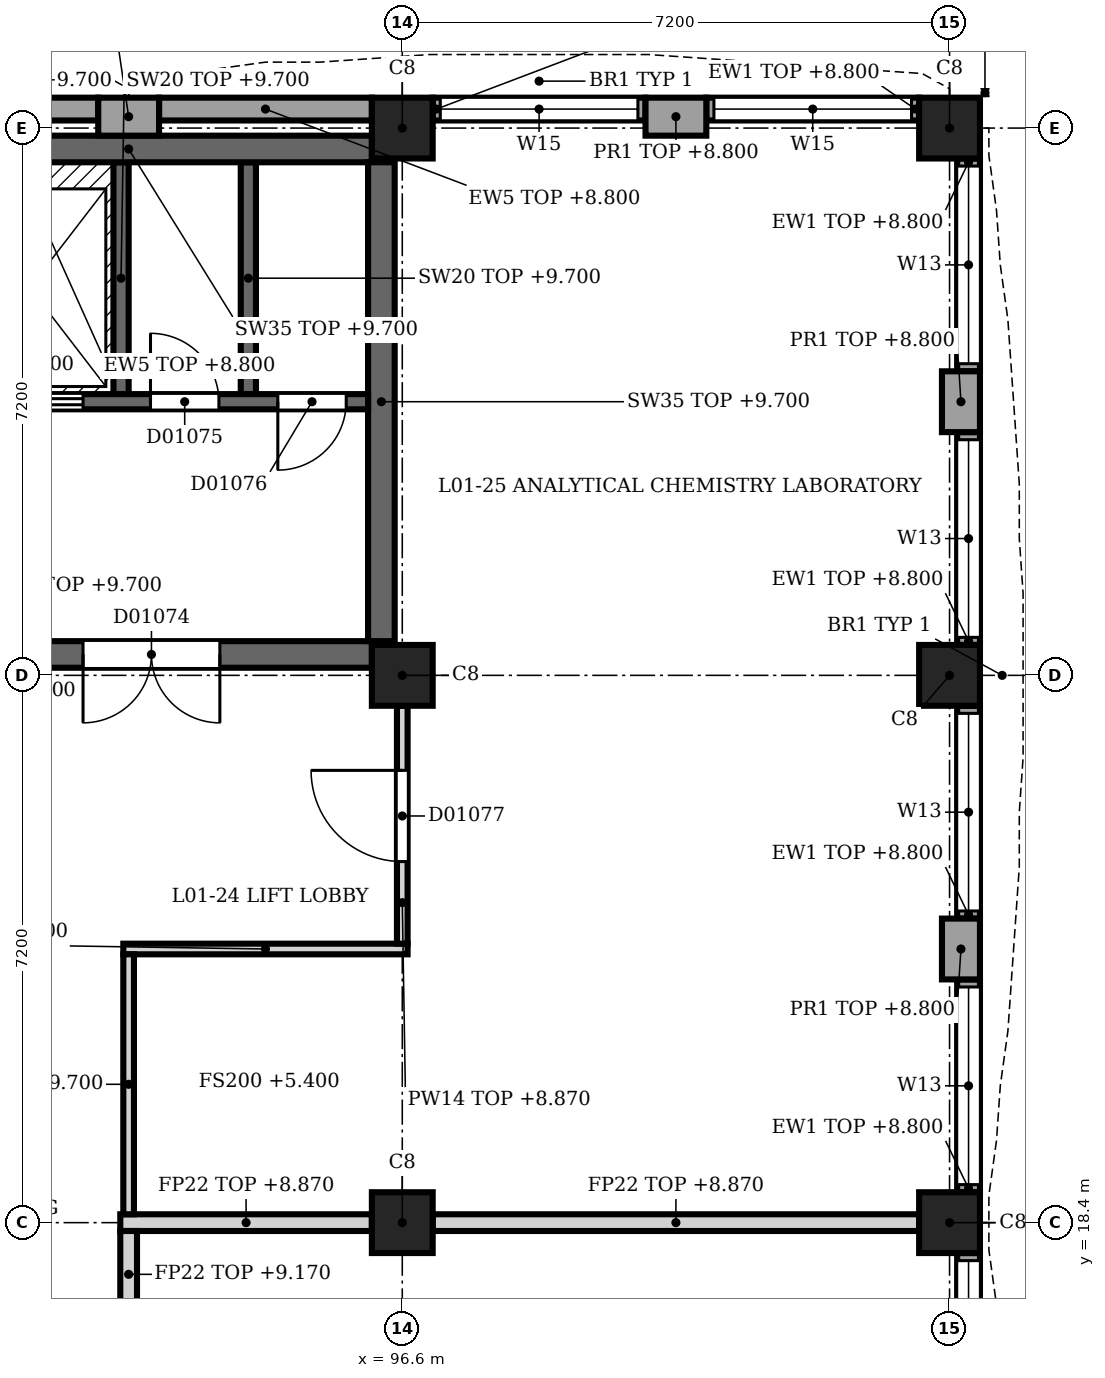
"""IFC4 building model, lengths in metres.
Left out: names, types, materials, properties, quantities, classifications, styles, units other than length and angle.
Written with IfcOpenShell. Run it as: python <this file> out.ifc"""

import sys

from ifc_helpers import new_model, si_unit, direction, frame, frame_2d, origin, origin_2d, place, context, subcontext, project, spatial, rectangle, extrude, element, fill, save


model = new_model("IFC4")
c1 = context("Model", 3, precision=1e-05, world=origin(), true_north=direction((0.0, 1.0)))
c2 = subcontext(c1, "Body", "Model", "MODEL_VIEW")
j1 = project(units=[si_unit("LENGTHUNIT", "METRE"), si_unit("PLANEANGLEUNIT", "RADIAN")], contexts=[c1])
p1 = place(None, origin())
s1 = spatial("IfcSite", under=j1, at=p1, CompositionType="ELEMENT")
p2 = place(p1, origin())
s2 = spatial("IfcBuilding", under=s1, at=p2, CompositionType="ELEMENT")
p3 = place(p2, frame((0.0, 0.0, 5.4)))
s3 = spatial("IfcBuildingStorey", under=s2, at=p3, CompositionType="ELEMENT", Elevation=5.4)
for number, where, z_axis, x_axis in (
    (1, (96.6, 18.4, 0.0), (0.0, 0.0, 1.0), (1.0, 0.0, 0.0)),
    (2, (96.6, 25.6, 0.0), (0.0, 0.0, 1.0), (1.0, 0.0, 0.0)),
    (3, (96.6, 32.8, 0.0), (0.0, 0.0, 1.0), (1.0, 0.0, 0.0)),
    (4, (103.8, 18.4, 0.0), (0.0, 0.0, 1.0), (1.0, 0.0, 0.0)),
    (5, (103.8, 25.6, 0.0), (0.0, 0.0, 1.0), (1.0, 0.0, 0.0)),
    (6, (103.8, 32.8, 0.0), (0.0, 0.0, 1.0), (1.0, 0.0, 0.0)),
):
    element("IfcColumn", number, at=place(p3, frame(where, z_axis=z_axis, x_axis=x_axis)), inside=s3, PredefinedType="COLUMN", context=c2, shape_type="SweptSolid", body=[
        extrude(rectangle(XDim=0.8, YDim=0.8, at=origin_2d()), origin(), (0.0, 0.0, 1.0), 4.5),
    ])
p4 = place(p3, frame((92.6, 32.95, 0.0), z_axis=(0.0, 0.0, 1.0), x_axis=(1.0, 0.0, 0.0)))
e7 = element("IfcWall", 7, at=p4, inside=s3, PredefinedType="SOLIDWALL", context=c2, shape_type="SweptSolid", body=[
    extrude(rectangle(XDim=0.8, YDim=0.5, at=frame_2d((0.4, 0.0))), origin(), (0.0, 0.0, 1.0), 3.4),
])
p5 = place(p3, frame((99.8, 32.95, 0.0), z_axis=(0.0, 0.0, 1.0), x_axis=(1.0, 0.0, 0.0)))
e8 = element("IfcWall", 8, at=p5, inside=s3, PredefinedType="SOLIDWALL", context=c2, shape_type="SweptSolid", body=[
    extrude(rectangle(XDim=0.8, YDim=0.5, at=frame_2d((0.4, 0.0))), origin(), (0.0, 0.0, 1.0), 3.4),
])
for number, where, z_axis, x_axis in (
    (9, (89.8, 33.05, 0.0), (0.0, 0.0, 1.0), (1.0, 0.0, 0.0)),
    (10, (93.4, 33.05, 0.0), (0.0, 0.0, 1.0), (1.0, 0.0, 0.0)),
):
    element("IfcWall", number, at=place(p3, frame(where, z_axis=z_axis, x_axis=x_axis)), inside=s3, PredefinedType="SOLIDWALL", context=c2, shape_type="SweptSolid", body=[
        extrude(rectangle(XDim=2.8, YDim=0.3, at=frame_2d((1.4, 0.0))), origin(), (0.0, 0.0, 1.0), 3.4),
    ])
p6 = place(p3, frame((97.0, 33.05, 0.0), z_axis=(0.0, 0.0, 1.0), x_axis=(1.0, 0.0, 0.0)))
e11 = element("IfcWall", 11, at=p6, inside=s3, PredefinedType="SOLIDWALL", context=c2, shape_type="SweptSolid", body=[
    extrude(rectangle(XDim=2.8, YDim=0.3, at=frame_2d((1.4, 0.0))), origin(), (0.0, 0.0, 1.0), 3.4),
])
p7 = place(p6, frame((0.1, 0.0, 1.0)))
e12 = element("IfcOpeningElement", 12, at=p7, cuts=e11, PredefinedType="OPENING", context=c2, shape_type="SweptSolid", body=[
    extrude(rectangle(XDim=2.6, YDim=2.0, at=frame_2d((1.3, 1.0))), frame((0.0, 0.16, 0.0), z_axis=(0.0, -1.0, 0.0), x_axis=(1.0, 0.0, 0.0)), (0.0, 0.0, 1.0), 0.32),
])
p8 = place(p3, frame((100.6, 33.05, 0.0), z_axis=(0.0, 0.0, 1.0), x_axis=(1.0, 0.0, 0.0)))
e13 = element("IfcWall", 13, at=p8, inside=s3, PredefinedType="SOLIDWALL", context=c2, shape_type="SweptSolid", body=[
    extrude(rectangle(XDim=2.8, YDim=0.3, at=frame_2d((1.4, 0.0))), origin(), (0.0, 0.0, 1.0), 3.4),
])
p9 = place(p8, frame((0.1, 0.0, 1.0)))
e14 = element("IfcOpeningElement", 14, at=p9, cuts=e13, PredefinedType="OPENING", context=c2, shape_type="SweptSolid", body=[
    extrude(rectangle(XDim=2.6, YDim=2.0, at=frame_2d((1.3, 1.0))), frame((0.0, 0.16, 0.0), z_axis=(0.0, -1.0, 0.0), x_axis=(1.0, 0.0, 0.0)), (0.0, 0.0, 1.0), 0.32),
])
p10 = place(p3, frame((103.95, 29.6, 0.0), z_axis=(0.0, 0.0, 1.0), x_axis=(0.0, -1.0, 0.0)))
e15 = element("IfcWall", 15, at=p10, inside=s3, PredefinedType="SOLIDWALL", context=c2, shape_type="SweptSolid", body=[
    extrude(rectangle(XDim=0.8, YDim=0.5, at=frame_2d((0.4, 0.0))), origin(), (0.0, 0.0, 1.0), 3.4),
])
p11 = place(p3, frame((103.95, 22.4, 0.0), z_axis=(0.0, 0.0, 1.0), x_axis=(0.0, -1.0, 0.0)))
e16 = element("IfcWall", 16, at=p11, inside=s3, PredefinedType="SOLIDWALL", context=c2, shape_type="SweptSolid", body=[
    extrude(rectangle(XDim=0.8, YDim=0.5, at=frame_2d((0.4, 0.0))), origin(), (0.0, 0.0, 1.0), 3.4),
])
p12 = place(p3, frame((104.05, 32.4, 0.0), z_axis=(0.0, 0.0, 1.0), x_axis=(0.0, -1.0, 0.0)))
e17 = element("IfcWall", 17, at=p12, inside=s3, PredefinedType="SOLIDWALL", context=c2, shape_type="SweptSolid", body=[
    extrude(rectangle(XDim=2.8, YDim=0.3, at=frame_2d((1.4, 0.0))), origin(), (0.0, 0.0, 1.0), 3.4),
])
p13 = place(p12, frame((0.1, 0.0, 0.9)))
e18 = element("IfcOpeningElement", 18, at=p13, cuts=e17, PredefinedType="OPENING", context=c2, shape_type="SweptSolid", body=[
    extrude(rectangle(XDim=2.6, YDim=2.2, at=frame_2d((1.3, 1.1))), frame((0.0, 0.16, 0.0), z_axis=(0.0, -1.0, 0.0), x_axis=(1.0, 0.0, 0.0)), (0.0, 0.0, 1.0), 0.32),
])
p14 = place(p3, frame((104.05, 28.8, 0.0), z_axis=(0.0, 0.0, 1.0), x_axis=(0.0, -1.0, 0.0)))
e19 = element("IfcWall", 19, at=p14, inside=s3, PredefinedType="SOLIDWALL", context=c2, shape_type="SweptSolid", body=[
    extrude(rectangle(XDim=2.8, YDim=0.3, at=frame_2d((1.4, 0.0))), origin(), (0.0, 0.0, 1.0), 3.4),
])
p15 = place(p14, frame((0.1, 0.0, 0.9)))
e20 = element("IfcOpeningElement", 20, at=p15, cuts=e19, PredefinedType="OPENING", context=c2, shape_type="SweptSolid", body=[
    extrude(rectangle(XDim=2.6, YDim=2.2, at=frame_2d((1.3, 1.1))), frame((0.0, 0.16, 0.0), z_axis=(0.0, -1.0, 0.0), x_axis=(1.0, 0.0, 0.0)), (0.0, 0.0, 1.0), 0.32),
])
p16 = place(p3, frame((104.05, 25.2, 0.0), z_axis=(0.0, 0.0, 1.0), x_axis=(0.0, -1.0, 0.0)))
e21 = element("IfcWall", 21, at=p16, inside=s3, PredefinedType="SOLIDWALL", context=c2, shape_type="SweptSolid", body=[
    extrude(rectangle(XDim=2.8, YDim=0.3, at=frame_2d((1.4, 0.0))), origin(), (0.0, 0.0, 1.0), 3.4),
])
p17 = place(p16, frame((0.1, 0.0, 0.9)))
e22 = element("IfcOpeningElement", 22, at=p17, cuts=e21, PredefinedType="OPENING", context=c2, shape_type="SweptSolid", body=[
    extrude(rectangle(XDim=2.6, YDim=2.2, at=frame_2d((1.3, 1.1))), frame((0.0, 0.16, 0.0), z_axis=(0.0, -1.0, 0.0), x_axis=(1.0, 0.0, 0.0)), (0.0, 0.0, 1.0), 0.32),
])
p18 = place(p3, frame((104.05, 21.6, 0.0), z_axis=(0.0, 0.0, 1.0), x_axis=(0.0, -1.0, 0.0)))
e23 = element("IfcWall", 23, at=p18, inside=s3, PredefinedType="SOLIDWALL", context=c2, shape_type="SweptSolid", body=[
    extrude(rectangle(XDim=2.8, YDim=0.3, at=frame_2d((1.4, 0.0))), origin(), (0.0, 0.0, 1.0), 3.4),
])
p19 = place(p18, frame((0.1, 0.0, 0.9)))
e24 = element("IfcOpeningElement", 24, at=p19, cuts=e23, PredefinedType="OPENING", context=c2, shape_type="SweptSolid", body=[
    extrude(rectangle(XDim=2.6, YDim=2.2, at=frame_2d((1.3, 1.1))), frame((0.0, 0.16, 0.0), z_axis=(0.0, -1.0, 0.0), x_axis=(1.0, 0.0, 0.0)), (0.0, 0.0, 1.0), 0.32),
])
p20 = place(p3, frame((104.05, 18.0, 0.0), z_axis=(0.0, 0.0, 1.0), x_axis=(0.0, -1.0, 0.0)))
e25 = element("IfcWall", 25, at=p20, inside=s3, PredefinedType="SOLIDWALL", context=c2, shape_type="SweptSolid", body=[
    extrude(rectangle(XDim=2.8, YDim=0.3, at=frame_2d((1.4, 0.0))), origin(), (0.0, 0.0, 1.0), 3.4),
])
p21 = place(p20, frame((0.1, 0.0, 0.9)))
e26 = element("IfcOpeningElement", 26, at=p21, cuts=e25, PredefinedType="OPENING", context=c2, shape_type="SweptSolid", body=[
    extrude(rectangle(XDim=2.6, YDim=2.2, at=frame_2d((1.3, 1.1))), frame((0.0, 0.16, 0.0), z_axis=(0.0, -1.0, 0.0), x_axis=(1.0, 0.0, 0.0)), (0.0, 0.0, 1.0), 0.32),
])
p22 = place(p3, frame((89.8, 25.875, 0.0), z_axis=(0.0, 0.0, 1.0), x_axis=(1.0, 0.0, 0.0)))
e27 = element("IfcWall", 27, at=p22, inside=s3, PredefinedType="SHEAR", context=c2, shape_type="SweptSolid", body=[
    extrude(rectangle(XDim=6.4, YDim=0.35, at=frame_2d((3.2, 0.0))), origin(), (0.0, 0.0, 1.0), 4.3),
])
p23 = place(p22, frame((2.6, 0.0, 0.0)))
e28 = element("IfcOpeningElement", 28, at=p23, cuts=e27, PredefinedType="OPENING", context=c2, shape_type="SweptSolid", body=[
    extrude(rectangle(XDim=1.8, YDim=2.1, at=frame_2d((0.9, 1.05))), frame((0.0, 0.185, 0.0), z_axis=(0.0, -1.0, 0.0), x_axis=(1.0, 0.0, 0.0)), (0.0, 0.0, 1.0), 0.37),
])
p24 = place(p3, frame((89.8, 32.525, 0.0), z_axis=(0.0, 0.0, 1.0), x_axis=(1.0, 0.0, 0.0)))
e29 = element("IfcWall", 29, at=p24, inside=s3, PredefinedType="SHEAR", context=c2, shape_type="SweptSolid", body=[
    extrude(rectangle(XDim=6.4, YDim=0.35, at=frame_2d((3.2, 0.0))), origin(), (0.0, 0.0, 1.0), 4.3),
])
p25 = place(p3, frame((96.325, 26.05, 0.0), z_axis=(0.0, 0.0, 1.0), x_axis=(0.0, 1.0, 0.0)))
e30 = element("IfcWall", 30, at=p25, inside=s3, PredefinedType="SHEAR", context=c2, shape_type="SweptSolid", body=[
    extrude(rectangle(XDim=6.3, YDim=0.35, at=frame_2d((3.15, 0.0))), origin(), (0.0, 0.0, 1.0), 4.3),
])
p26 = place(p3, frame((96.15, 29.2, 0.0), z_axis=(0.0, 0.0, 1.0), x_axis=(-1.0, 0.0, 0.0)))
e31 = element("IfcWall", 31, at=p26, inside=s3, PredefinedType="SHEAR", context=c2, shape_type="SweptSolid", body=[
    extrude(rectangle(XDim=10.35, YDim=0.2, at=frame_2d((5.175, 0.0))), origin(), (0.0, 0.0, 1.0), 4.3),
])
p27 = place(p26, frame((8.8, 0.0, 0.0)))
e32 = element("IfcOpeningElement", 32, at=p27, cuts=e31, PredefinedType="OPENING", context=c2, shape_type="SweptSolid", body=[
    extrude(rectangle(XDim=1.1, YDim=2.1, at=frame_2d((0.55, 1.05))), frame((0.0, 0.11, 0.0), z_axis=(0.0, -1.0, 0.0), x_axis=(1.0, 0.0, 0.0)), (0.0, 0.0, 1.0), 0.22),
])
p28 = place(p26, frame((6.6, 0.0, 0.0)))
e33 = element("IfcOpeningElement", 33, at=p28, cuts=e31, PredefinedType="OPENING", context=c2, shape_type="SweptSolid", body=[
    extrude(rectangle(XDim=1.1, YDim=2.1, at=frame_2d((0.55, 1.05))), frame((0.0, 0.11, 0.0), z_axis=(0.0, -1.0, 0.0), x_axis=(1.0, 0.0, 0.0)), (0.0, 0.0, 1.0), 0.22),
])
p29 = place(p26, frame((3.75, 0.0, 0.0)))
e34 = element("IfcOpeningElement", 34, at=p29, cuts=e31, PredefinedType="OPENING", context=c2, shape_type="SweptSolid", body=[
    extrude(rectangle(XDim=1.4, YDim=2.1, at=frame_2d((0.7, 1.05))), frame((0.0, 0.11, 0.0), z_axis=(0.0, -1.0, 0.0), x_axis=(1.0, 0.0, 0.0)), (0.0, 0.0, 1.0), 0.22),
])
p30 = place(p26, frame((1.962, 0.0, 0.0)))
e35 = element("IfcOpeningElement", 35, at=p30, cuts=e31, PredefinedType="OPENING", context=c2, shape_type="SweptSolid", body=[
    extrude(rectangle(XDim=0.9, YDim=2.1, at=frame_2d((0.45, 1.05))), frame((0.0, 0.11, 0.0), z_axis=(0.0, -1.0, 0.0), x_axis=(1.0, 0.0, 0.0)), (0.0, 0.0, 1.0), 0.22),
])
p31 = place(p26, frame((0.288, 0.0, 0.0)))
e36 = element("IfcOpeningElement", 36, at=p31, cuts=e31, PredefinedType="OPENING", context=c2, shape_type="SweptSolid", body=[
    extrude(rectangle(XDim=0.9, YDim=2.1, at=frame_2d((0.45, 1.05))), frame((0.0, 0.11, 0.0), z_axis=(0.0, -1.0, 0.0), x_axis=(1.0, 0.0, 0.0)), (0.0, 0.0, 1.0), 0.22),
])
for number, where, z_axis, x_axis in (
    (37, (92.9, 29.3, 0.0), (0.0, 0.0, 1.0), (0.0, 1.0, 0.0)),
    (38, (94.575, 29.3, 0.0), (0.0, 0.0, 1.0), (0.0, 1.0, 0.0)),
):
    element("IfcWall", number, at=place(p3, frame(where, z_axis=z_axis, x_axis=x_axis)), inside=s3, PredefinedType="SHEAR", context=c2, shape_type="SweptSolid", body=[
        extrude(rectangle(XDim=3.05, YDim=0.2, at=frame_2d((1.525, 0.0))), origin(), (0.0, 0.0, 1.0), 4.3),
    ])
p32 = place(p3, frame((92.89, 18.4, 0.0), z_axis=(0.0, 0.0, 1.0), x_axis=(1.0, 0.0, 0.0)))
e39 = element("IfcWall", 39, at=p32, inside=s3, PredefinedType="PARTITIONING", context=c2, shape_type="SweptSolid", body=[
    extrude(rectangle(XDim=3.31, YDim=0.22, at=frame_2d((1.655, 0.0))), origin(), (0.0, 0.0, 1.0), 3.47),
])
p33 = place(p3, frame((97.0, 18.4, 0.0), z_axis=(0.0, 0.0, 1.0), x_axis=(1.0, 0.0, 0.0)))
e40 = element("IfcWall", 40, at=p33, inside=s3, PredefinedType="PARTITIONING", context=c2, shape_type="SweptSolid", body=[
    extrude(rectangle(XDim=6.4, YDim=0.22, at=frame_2d((3.2, 0.0))), origin(), (0.0, 0.0, 1.0), 3.47),
])
p34 = place(p3, frame((92.93, 22.0, 0.0), z_axis=(0.0, 0.0, 1.0), x_axis=(1.0, 0.0, 0.0)))
e41 = element("IfcWall", 41, at=p34, inside=s3, PredefinedType="PARTITIONING", context=c2, shape_type="SweptSolid", body=[
    extrude(rectangle(XDim=3.74, YDim=0.14, at=frame_2d((1.87, 0.0))), origin(), (0.0, 0.0, 1.0), 4.3),
])
p35 = place(p3, frame((93.0, 18.29, 0.0), z_axis=(0.0, 0.0, 1.0), x_axis=(0.0, -1.0, 0.0)))
e42 = element("IfcWall", 42, at=p35, inside=s3, PredefinedType="PARTITIONING", context=c2, shape_type="SweptSolid", body=[
    extrude(rectangle(XDim=3.38, YDim=0.22, at=frame_2d((1.69, 0.0))), origin(), (0.0, 0.0, 1.0), 3.77),
])
p36 = place(p35, frame((1.14, 0.0, 0.0)))
e43 = element("IfcOpeningElement", 43, at=p36, cuts=e42, PredefinedType="OPENING", context=c2, shape_type="SweptSolid", body=[
    extrude(rectangle(XDim=1.1, YDim=2.3, at=frame_2d((0.55, 1.15))), frame((0.0, 0.12, 0.0), z_axis=(0.0, -1.0, 0.0), x_axis=(1.0, 0.0, 0.0)), (0.0, 0.0, 1.0), 0.24),
])
p37 = place(p3, frame((93.0, 18.51, 0.0), z_axis=(0.0, 0.0, 1.0), x_axis=(0.0, 1.0, 0.0)))
e44 = element("IfcWall", 44, at=p37, inside=s3, PredefinedType="PARTITIONING", context=c2, shape_type="SweptSolid", body=[
    extrude(rectangle(XDim=3.42, YDim=0.14, at=frame_2d((1.71, 0.0))), origin(), (0.0, 0.0, 1.0), 4.3),
])
p38 = place(p3, frame((96.6, 25.2, 0.0), z_axis=(0.0, 0.0, 1.0), x_axis=(0.0, -1.0, 0.0)))
e45 = element("IfcWall", 45, at=p38, inside=s3, PredefinedType="PARTITIONING", context=c2, shape_type="SweptSolid", body=[
    extrude(rectangle(XDim=3.13, YDim=0.14, at=frame_2d((1.565, 0.0))), origin(), (0.0, 0.0, 1.0), 3.47),
])
p39 = place(p38, frame((0.85, 0.0, 0.0)))
e46 = element("IfcOpeningElement", 46, at=p39, cuts=e45, PredefinedType="OPENING", context=c2, shape_type="SweptSolid", body=[
    extrude(rectangle(XDim=1.2, YDim=2.1, at=frame_2d((0.6, 1.05))), frame((0.0, 0.08, 0.0), z_axis=(0.0, -1.0, 0.0), x_axis=(1.0, 0.0, 0.0)), (0.0, 0.0, 1.0), 0.16),
])
p40 = place(p7, origin())
e47 = element("IfcWindow", 47, at=p40, inside=s3, PartitioningType="SINGLE_PANEL", PredefinedType="WINDOW", context=c2, shape_type="SweptSolid", body=[
    extrude(rectangle(XDim=2.6, YDim=2.0, at=frame_2d((1.3, 1.0))), frame((0.0, 0.03, 0.0), z_axis=(0.0, -1.0, 0.0), x_axis=(1.0, 0.0, 0.0)), (0.0, 0.0, 1.0), 0.06),
])
fill(e12, e47)
p41 = place(p9, origin())
e48 = element("IfcWindow", 48, at=p41, inside=s3, PartitioningType="SINGLE_PANEL", PredefinedType="WINDOW", context=c2, shape_type="SweptSolid", body=[
    extrude(rectangle(XDim=2.6, YDim=2.0, at=frame_2d((1.3, 1.0))), frame((0.0, 0.03, 0.0), z_axis=(0.0, -1.0, 0.0), x_axis=(1.0, 0.0, 0.0)), (0.0, 0.0, 1.0), 0.06),
])
fill(e14, e48)
p42 = place(p13, origin())
e49 = element("IfcWindow", 49, at=p42, inside=s3, PartitioningType="SINGLE_PANEL", PredefinedType="WINDOW", context=c2, shape_type="SweptSolid", body=[
    extrude(rectangle(XDim=2.6, YDim=2.2, at=frame_2d((1.3, 1.1))), frame((0.0, 0.03, 0.0), z_axis=(0.0, -1.0, 0.0), x_axis=(1.0, 0.0, 0.0)), (0.0, 0.0, 1.0), 0.06),
])
fill(e18, e49)
p43 = place(p15, origin())
e50 = element("IfcWindow", 50, at=p43, inside=s3, PartitioningType="SINGLE_PANEL", PredefinedType="WINDOW", context=c2, shape_type="SweptSolid", body=[
    extrude(rectangle(XDim=2.6, YDim=2.2, at=frame_2d((1.3, 1.1))), frame((0.0, 0.03, 0.0), z_axis=(0.0, -1.0, 0.0), x_axis=(1.0, 0.0, 0.0)), (0.0, 0.0, 1.0), 0.06),
])
fill(e20, e50)
p44 = place(p17, origin())
e51 = element("IfcWindow", 51, at=p44, inside=s3, PartitioningType="SINGLE_PANEL", PredefinedType="WINDOW", context=c2, shape_type="SweptSolid", body=[
    extrude(rectangle(XDim=2.6, YDim=2.2, at=frame_2d((1.3, 1.1))), frame((0.0, 0.03, 0.0), z_axis=(0.0, -1.0, 0.0), x_axis=(1.0, 0.0, 0.0)), (0.0, 0.0, 1.0), 0.06),
])
fill(e22, e51)
p45 = place(p19, origin())
e52 = element("IfcWindow", 52, at=p45, inside=s3, PartitioningType="SINGLE_PANEL", PredefinedType="WINDOW", context=c2, shape_type="SweptSolid", body=[
    extrude(rectangle(XDim=2.6, YDim=2.2, at=frame_2d((1.3, 1.1))), frame((0.0, 0.03, 0.0), z_axis=(0.0, -1.0, 0.0), x_axis=(1.0, 0.0, 0.0)), (0.0, 0.0, 1.0), 0.06),
])
fill(e24, e52)
p46 = place(p21, origin())
e53 = element("IfcWindow", 53, at=p46, inside=s3, PartitioningType="SINGLE_PANEL", PredefinedType="WINDOW", context=c2, shape_type="SweptSolid", body=[
    extrude(rectangle(XDim=2.6, YDim=2.2, at=frame_2d((1.3, 1.1))), frame((0.0, 0.03, 0.0), z_axis=(0.0, -1.0, 0.0), x_axis=(1.0, 0.0, 0.0)), (0.0, 0.0, 1.0), 0.06),
])
fill(e26, e53)
p47 = place(p23, origin())
e54 = element("IfcDoor", 54, at=p47, inside=s3, OperationType="SINGLE_SWING_LEFT", PredefinedType="DOOR", context=c2, shape_type="SweptSolid", body=[
    extrude(rectangle(XDim=1.8, YDim=2.1, at=frame_2d((0.9, 1.05))), frame((0.0, 0.025, 0.0), z_axis=(0.0, -1.0, 0.0), x_axis=(1.0, 0.0, 0.0)), (0.0, 0.0, 1.0), 0.05),
])
fill(e28, e54)
p48 = place(p29, origin())
e55 = element("IfcDoor", 55, at=p48, inside=s3, OperationType="DOUBLE_DOOR_SLIDING", PredefinedType="DOOR", context=c2, shape_type="SweptSolid", body=[
    extrude(rectangle(XDim=1.4, YDim=2.1, at=frame_2d((0.7, 1.05))), frame((0.0, 0.025, 0.0), z_axis=(0.0, -1.0, 0.0), x_axis=(1.0, 0.0, 0.0)), (0.0, 0.0, 1.0), 0.05),
])
fill(e34, e55)
p49 = place(p30, origin())
e56 = element("IfcDoor", 56, at=p49, inside=s3, OperationType="SINGLE_SWING_LEFT", PredefinedType="DOOR", context=c2, shape_type="SweptSolid", body=[
    extrude(rectangle(XDim=0.9, YDim=2.1, at=frame_2d((0.45, 1.05))), frame((0.0, 0.025, 0.0), z_axis=(0.0, -1.0, 0.0), x_axis=(1.0, 0.0, 0.0)), (0.0, 0.0, 1.0), 0.05),
])
fill(e35, e56)
p50 = place(p31, origin())
e57 = element("IfcDoor", 57, at=p50, inside=s3, OperationType="SINGLE_SWING_LEFT", PredefinedType="DOOR", context=c2, shape_type="SweptSolid", body=[
    extrude(rectangle(XDim=0.9, YDim=2.1, at=frame_2d((0.45, 1.05))), frame((0.0, 0.025, 0.0), z_axis=(0.0, -1.0, 0.0), x_axis=(1.0, 0.0, 0.0)), (0.0, 0.0, 1.0), 0.05),
])
fill(e36, e57)
p51 = place(p39, origin())
e58 = element("IfcDoor", 58, at=p51, inside=s3, OperationType="SINGLE_SWING_LEFT", PredefinedType="DOOR", context=c2, shape_type="SweptSolid", body=[
    extrude(rectangle(XDim=1.2, YDim=2.1, at=frame_2d((0.6, 1.05))), frame((0.0, 0.025, 0.0), z_axis=(0.0, -1.0, 0.0), x_axis=(1.0, 0.0, 0.0)), (0.0, 0.0, 1.0), 0.05),
])
fill(e46, e58)
save(model, sys.argv[1])
